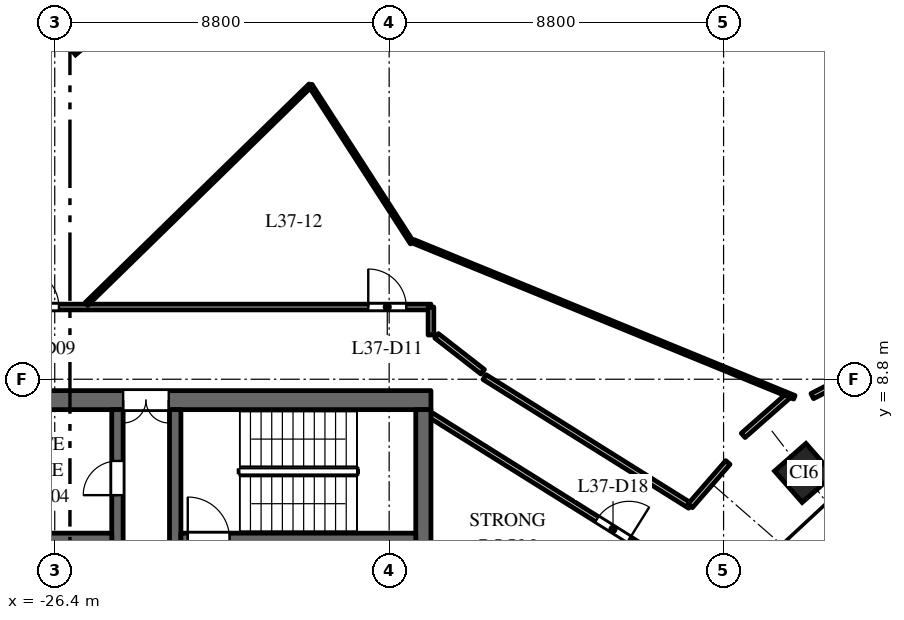
"""IFC4 building model, lengths in metres.
Left out: names, types, materials, properties, quantities, classifications, styles, units other than length and angle.
Written with IfcOpenShell. Run it as: python <this file> out.ifc"""

import sys

from ifc_helpers import new_model, si_unit, direction, frame, frame_2d, origin, origin_2d, place, context, subcontext, project, spatial, rectangle, extrude, element, fill, save


model = new_model("IFC4")
c1 = context("Model", 3, precision=1e-05, world=origin(), true_north=direction((0.0, 1.0)))
c2 = subcontext(c1, "Body", "Model", "MODEL_VIEW")
j1 = project(units=[si_unit("LENGTHUNIT", "METRE"), si_unit("PLANEANGLEUNIT", "RADIAN")], contexts=[c1])
p1 = place(None, origin())
s1 = spatial("IfcSite", under=j1, at=p1, CompositionType="ELEMENT")
p2 = place(p1, origin())
s2 = spatial("IfcBuilding", under=s1, at=p2, CompositionType="ELEMENT")
p3 = place(p2, frame((0.0, 0.0, 162.0)))
s3 = spatial("IfcBuildingStorey", under=s2, at=p3, CompositionType="ELEMENT", Elevation=162.0)
p4 = place(p3, frame((-25.783, 18.18, 0.0), z_axis=(0.0, 0.0, 1.0), x_axis=(-0.763035199656, -0.646356932419, 0.0)))
e1 = element("IfcColumn", 1, at=p4, inside=s3, PredefinedType="COLUMN", context=c2, shape_type="SweptSolid", body=[
    extrude(rectangle(XDim=1.2, YDim=1.2, at=origin_2d()), origin(), (0.0, 0.0, 1.0), 4.0),
])
p5 = place(p3, frame((-6.682, 6.334, 0.0), z_axis=(0.0, 0.0, 1.0), x_axis=(-0.75102249095, -0.660276622399, 0.0)))
e2 = element("IfcColumn", 2, at=p5, inside=s3, PredefinedType="COLUMN", context=c2, shape_type="SweptSolid", body=[
    extrude(rectangle(XDim=1.1, YDim=1.1, at=origin_2d()), origin(), (0.0, 0.0, 1.0), 4.0),
])
p6 = place(p3, frame((-16.5, 8.25, 0.0), z_axis=(0.0, 0.0, 1.0), x_axis=(-1.0, 0.0, 0.0)))
e3 = element("IfcWall", 3, at=p6, inside=s3, PredefinedType="SHEAR", context=c2, shape_type="SweptSolid", body=[
    extrude(rectangle(XDim=15.0, YDim=0.5, at=frame_2d((7.5, 0.0))), origin(), (0.0, 0.0, 1.0), 3.7),
])
p7 = place(p6, frame((6.9, 0.0, 0.0)))
e4 = element("IfcOpeningElement", 4, at=p7, cuts=e3, PredefinedType="OPENING", context=c2, shape_type="SweptSolid", body=[
    extrude(rectangle(XDim=1.2, YDim=2.1, at=frame_2d((0.6, 1.05))), frame((0.0, 0.26, 0.0), z_axis=(0.0, -1.0, 0.0), x_axis=(1.0, 0.0, 0.0)), (0.0, 0.0, 1.0), 0.52),
])
p8 = place(p6, frame((12.95, 0.0, 0.0)))
e5 = element("IfcOpeningElement", 5, at=p8, cuts=e3, PredefinedType="OPENING", context=c2, shape_type="SweptSolid", body=[
    extrude(rectangle(XDim=0.9, YDim=2.1, at=frame_2d((0.45, 1.05))), frame((0.0, 0.26, 0.0), z_axis=(0.0, -1.0, 0.0), x_axis=(1.0, 0.0, 0.0)), (0.0, 0.0, 1.0), 0.52),
])
p9 = place(p3, frame((-24.75, -8.0, 0.0), z_axis=(0.0, 0.0, 1.0), x_axis=(0.0, 1.0, 0.0)))
e6 = element("IfcWall", 6, at=p9, inside=s3, PredefinedType="SHEAR", context=c2, shape_type="SweptSolid", body=[
    extrude(rectangle(XDim=16.0, YDim=0.3, at=frame_2d((8.0, 0.0))), origin(), (0.0, 0.0, 1.0), 3.7),
])
p10 = place(p9, frame((4.425, 0.0, 0.0)))
e7 = element("IfcOpeningElement", 7, at=p10, cuts=e6, PredefinedType="OPENING", context=c2, shape_type="SweptSolid", body=[
    extrude(rectangle(XDim=1.1, YDim=2.1, at=frame_2d((0.55, 1.05))), frame((0.0, 0.16, 0.0), z_axis=(0.0, -1.0, 0.0), x_axis=(1.0, 0.0, 0.0)), (0.0, 0.0, 1.0), 0.32),
])
p11 = place(p9, frame((7.45, 0.0, 0.0)))
e8 = element("IfcOpeningElement", 8, at=p11, cuts=e6, PredefinedType="OPENING", context=c2, shape_type="SweptSolid", body=[
    extrude(rectangle(XDim=1.1, YDim=2.1, at=frame_2d((0.55, 1.05))), frame((0.0, 0.16, 0.0), z_axis=(0.0, -1.0, 0.0), x_axis=(1.0, 0.0, 0.0)), (0.0, 0.0, 1.0), 0.32),
])
p12 = place(p9, frame((10.475, 0.0, 0.0)))
e9 = element("IfcOpeningElement", 9, at=p12, cuts=e6, PredefinedType="OPENING", context=c2, shape_type="SweptSolid", body=[
    extrude(rectangle(XDim=1.1, YDim=2.1, at=frame_2d((0.55, 1.05))), frame((0.0, 0.16, 0.0), z_axis=(0.0, -1.0, 0.0), x_axis=(1.0, 0.0, 0.0)), (0.0, 0.0, 1.0), 0.32),
])
p13 = place(p9, frame((13.75, 0.0, 0.0)))
e10 = element("IfcOpeningElement", 10, at=p13, cuts=e6, PredefinedType="OPENING", context=c2, shape_type="SweptSolid", body=[
    extrude(rectangle(XDim=0.9, YDim=2.1, at=frame_2d((0.45, 1.05))), frame((0.0, 0.16, 0.0), z_axis=(0.0, -1.0, 0.0), x_axis=(1.0, 0.0, 0.0)), (0.0, 0.0, 1.0), 0.32),
])
p14 = place(p9, frame((1.35, 0.0, 0.0)))
e11 = element("IfcOpeningElement", 11, at=p14, cuts=e6, PredefinedType="OPENING", context=c2, shape_type="SweptSolid", body=[
    extrude(rectangle(XDim=0.9, YDim=2.1, at=frame_2d((0.45, 1.05))), frame((0.0, 0.16, 0.0), z_axis=(0.0, -1.0, 0.0), x_axis=(1.0, 0.0, 0.0)), (0.0, 0.0, 1.0), 0.32),
])
p15 = place(p3, frame((-16.7, -8.0, 0.0), z_axis=(0.0, 0.0, 1.0), x_axis=(0.0, 1.0, 0.0)))
e12 = element("IfcWall", 12, at=p15, inside=s3, PredefinedType="SHEAR", context=c2, shape_type="SweptSolid", body=[
    extrude(rectangle(XDim=16.0, YDim=0.4, at=frame_2d((8.0, 0.0))), origin(), (0.0, 0.0, 1.0), 3.7),
])
p16 = place(p3, frame((-24.9, 4.6, 0.0), z_axis=(0.0, 0.0, 1.0), x_axis=(-1.0, 0.0, 0.0)))
e13 = element("IfcWall", 13, at=p16, inside=s3, PredefinedType="SHEAR", context=c2, shape_type="SweptSolid", body=[
    extrude(rectangle(XDim=6.1, YDim=0.3, at=frame_2d((3.05, 0.0))), origin(), (0.0, 0.0, 1.0), 3.7),
])
p17 = place(p16, frame((4.2, 0.0, 0.0)))
e14 = element("IfcOpeningElement", 14, at=p17, cuts=e13, PredefinedType="OPENING", context=c2, shape_type="SweptSolid", body=[
    extrude(rectangle(XDim=0.9, YDim=2.1, at=frame_2d((0.45, 1.05))), frame((0.0, 0.16, 0.0), z_axis=(0.0, -1.0, 0.0), x_axis=(1.0, 0.0, 0.0)), (0.0, 0.0, 1.0), 0.32),
])
p18 = place(p3, frame((-23.23, 2.25, 0.0), z_axis=(0.0, 0.0, 1.0), x_axis=(0.0, 1.0, 0.0)))
e15 = element("IfcWall", 15, at=p18, inside=s3, PredefinedType="SHEAR", context=c2, shape_type="SweptSolid", body=[
    extrude(rectangle(XDim=5.75, YDim=0.3, at=frame_2d((2.875, 0.0))), origin(), (0.0, 0.0, 1.0), 3.7),
])
p19 = place(p18, frame((0.6, 0.0, 0.0)))
e16 = element("IfcOpeningElement", 16, at=p19, cuts=e15, PredefinedType="OPENING", context=c2, shape_type="SweptSolid", body=[
    extrude(rectangle(XDim=1.0, YDim=2.1, at=frame_2d((0.5, 1.05))), frame((0.0, 0.16, 0.0), z_axis=(0.0, -1.0, 0.0), x_axis=(1.0, 0.0, 0.0)), (0.0, 0.0, 1.0), 0.32),
])
p20 = place(p3, frame((-16.9, 4.6, 0.0), z_axis=(0.0, 0.0, 1.0), x_axis=(-1.0, 0.0, 0.0)))
e17 = element("IfcWall", 17, at=p20, inside=s3, PredefinedType="SHEAR", context=c2, shape_type="SweptSolid", body=[
    extrude(rectangle(XDim=6.18, YDim=0.3, at=frame_2d((3.09, 0.0))), origin(), (0.0, 0.0, 1.0), 3.7),
])
p21 = place(p20, frame((4.9, 0.0, 0.0)))
e18 = element("IfcOpeningElement", 18, at=p21, cuts=e17, PredefinedType="OPENING", context=c2, shape_type="SweptSolid", body=[
    extrude(rectangle(XDim=1.1, YDim=2.1, at=frame_2d((0.55, 1.05))), frame((0.0, 0.16, 0.0), z_axis=(0.0, -1.0, 0.0), x_axis=(1.0, 0.0, 0.0)), (0.0, 0.0, 1.0), 0.32),
])
p22 = place(p3, frame((-31.5, 10.7, 0.0), z_axis=(0.0, 0.0, 1.0), x_axis=(1.0, 0.0, 0.0)))
e19 = element("IfcWall", 19, at=p22, inside=s3, PredefinedType="PARTITIONING", context=c2, shape_type="SweptSolid", body=[
    extrude(rectangle(XDim=15.0, YDim=0.15, at=frame_2d((7.5, 0.0))), origin(), (0.0, 0.0, 1.0), 3.1),
])
p23 = place(p22, frame((4.21, 0.0, 0.0)))
e20 = element("IfcOpeningElement", 20, at=p23, cuts=e19, PredefinedType="OPENING", context=c2, shape_type="SweptSolid", body=[
    extrude(rectangle(XDim=1.0, YDim=2.1, at=frame_2d((0.5, 1.05))), frame((0.0, 0.085, 0.0), z_axis=(0.0, -1.0, 0.0), x_axis=(1.0, 0.0, 0.0)), (0.0, 0.0, 1.0), 0.17),
])
p24 = place(p22, frame((13.35, 0.0, 0.0)))
e21 = element("IfcOpeningElement", 21, at=p24, cuts=e19, PredefinedType="OPENING", context=c2, shape_type="SweptSolid", body=[
    extrude(rectangle(XDim=1.0, YDim=2.1, at=frame_2d((0.5, 1.05))), frame((0.0, 0.085, 0.0), z_axis=(0.0, -1.0, 0.0), x_axis=(1.0, 0.0, 0.0)), (0.0, 0.0, 1.0), 0.17),
])
p25 = place(p3, frame((-25.566, 10.778, 0.0), z_axis=(0.0, 0.0, 1.0), x_axis=(0.715430617602, 0.698683784982, 0.0)))
e22 = element("IfcWall", 22, at=p25, inside=s3, PredefinedType="PARTITIONING", context=c2, shape_type="SweptSolid", body=[
    extrude(rectangle(XDim=8.237, YDim=0.1, at=frame_2d((4.118, 0.0))), origin(), (0.0, 0.0, 1.0), 2.75),
])
p26 = place(p3, frame((-19.673, 16.533, 0.0), z_axis=(0.0, 0.0, 1.0), x_axis=(0.542297022656, -0.840186847801, 0.0)))
e23 = element("IfcWall", 23, at=p26, inside=s3, PredefinedType="PARTITIONING", context=c2, shape_type="SweptSolid", body=[
    extrude(rectangle(XDim=4.935, YDim=0.1, at=frame_2d((2.467, 0.0))), origin(), (0.0, 0.0, 1.0), 3.7),
])
p27 = place(p3, frame((-16.963, 12.427, 0.0), z_axis=(0.0, 0.0, 1.0), x_axis=(0.925484473487, -0.378785545308, 0.0)))
e24 = element("IfcWall", 24, at=p27, inside=s3, PredefinedType="PARTITIONING", context=c2, shape_type="SweptSolid", body=[
    extrude(rectangle(XDim=10.832, YDim=0.1, at=frame_2d((5.416, 0.0))), origin(), (0.0, 0.0, 1.0), 3.7),
])
p28 = place(p3, frame((-16.5, 9.964, 0.0), z_axis=(0.0, 0.0, 1.0), x_axis=(0.0, 1.0, 0.0)))
e25 = element("IfcWall", 25, at=p28, inside=s3, PredefinedType="PARTITIONING", context=c2, shape_type="SweptSolid", body=[
    extrude(rectangle(XDim=0.736, YDim=0.15, at=frame_2d((0.368, 0.0))), origin(), (0.0, 0.0, 1.0), 3.7),
])
p29 = place(p3, frame((-16.5, 7.851, 0.0), z_axis=(0.0, 0.0, 1.0), x_axis=(0.847690706888, -0.530490777917, 0.0)))
e26 = element("IfcWall", 26, at=p29, inside=s3, PredefinedType="PARTITIONING", context=c2, shape_type="SweptSolid", body=[
    extrude(rectangle(XDim=6.781, YDim=0.15, at=frame_2d((3.39, 0.0))), origin(), (0.0, 0.0, 1.0), 3.7),
])
p30 = place(p29, frame((5.151, 0.0, 0.0)))
e27 = element("IfcOpeningElement", 27, at=p30, cuts=e26, PredefinedType="OPENING", context=c2, shape_type="SweptSolid", body=[
    extrude(rectangle(XDim=1.0, YDim=2.1, at=frame_2d((0.5, 1.05))), frame((0.0, 0.085, 0.0), z_axis=(0.0, -1.0, 0.0), x_axis=(1.0, 0.0, 0.0)), (0.0, 0.0, 1.0), 0.17),
])
p31 = place(p3, frame((-15.089, 8.856, 0.0), z_axis=(0.0, 0.0, 1.0), x_axis=(0.847602682855, -0.530631408811, 0.0)))
e28 = element("IfcWall", 28, at=p31, inside=s3, PredefinedType="PARTITIONING", context=c2, shape_type="SweptSolid", body=[
    extrude(rectangle(XDim=6.383, YDim=0.15, at=frame_2d((3.191, 0.0))), origin(), (0.0, 0.0, 1.0), 3.7),
])
p32 = place(p3, frame((-9.679, 5.469, 0.0), z_axis=(0.0, 0.0, 1.0), x_axis=(0.656454677423, 0.75436546613, 0.0)))
e29 = element("IfcWall", 29, at=p32, inside=s3, PredefinedType="PARTITIONING", context=c2, shape_type="SweptSolid", body=[
    extrude(rectangle(XDim=1.511, YDim=0.15, at=frame_2d((0.755, 0.0))), origin(), (0.0, 0.0, 1.0), 2.75),
])
p33 = place(p3, frame((-8.284, 7.322, 0.0), z_axis=(0.0, 0.0, 1.0), x_axis=(0.750666784408, 0.660680996235, 0.0)))
e30 = element("IfcWall", 30, at=p33, inside=s3, PredefinedType="PARTITIONING", context=c2, shape_type="SweptSolid", body=[
    extrude(rectangle(XDim=1.555, YDim=0.15, at=frame_2d((0.777, 0.0))), origin(), (0.0, 0.0, 1.0), 3.7),
])
p34 = place(p3, frame((-6.466, 8.356, 0.0), z_axis=(0.0, 0.0, 1.0), x_axis=(0.889472002788, 0.456989667559, 0.0)))
e31 = element("IfcWall", 31, at=p34, inside=s3, PredefinedType="PARTITIONING", context=c2, shape_type="SweptSolid", body=[
    extrude(rectangle(XDim=1.355, YDim=0.15, at=frame_2d((0.677, 0.0))), origin(), (0.0, 0.0, 1.0), 3.7),
])
p35 = place(p3, frame((-16.352, 9.942, 0.0), z_axis=(0.0, 0.0, 1.0), x_axis=(0.788950226826, -0.614457109643, 0.0)))
e32 = element("IfcWall", 32, at=p35, inside=s3, PredefinedType="PARTITIONING", context=c2, shape_type="SweptSolid", body=[
    extrude(rectangle(XDim=1.538, YDim=0.15, at=frame_2d((0.769, 0.0))), origin(), (0.0, 0.0, 1.0), 3.7),
])
p36 = place(p21, origin())
e33 = element("IfcDoor", 33, at=p36, inside=s3, OperationType="SINGLE_SWING_RIGHT", PredefinedType="DOOR", context=c2, shape_type="SweptSolid", body=[
    extrude(rectangle(XDim=1.1, YDim=2.1, at=frame_2d((0.55, 1.05))), frame((0.0, 0.025, 0.0), z_axis=(0.0, -1.0, 0.0), x_axis=(1.0, 0.0, 0.0)), (0.0, 0.0, 1.0), 0.05),
])
fill(e18, e33)
p37 = place(p7, origin())
e34 = element("IfcDoor", 34, at=p37, inside=s3, OperationType="DOUBLE_DOOR_DOUBLE_SWING", PredefinedType="DOOR", context=c2, shape_type="SweptSolid", body=[
    extrude(rectangle(XDim=1.2, YDim=2.1, at=frame_2d((0.6, 1.05))), frame((0.0, 0.025, 0.0), z_axis=(0.0, -1.0, 0.0), x_axis=(1.0, 0.0, 0.0)), (0.0, 0.0, 1.0), 0.05),
])
fill(e4, e34)
p38 = place(p13, origin())
e35 = element("IfcDoor", 35, at=p38, inside=s3, OperationType="SINGLE_SWING_RIGHT", PredefinedType="DOOR", context=c2, shape_type="SweptSolid", body=[
    extrude(rectangle(XDim=0.9, YDim=2.1, at=frame_2d((0.45, 1.05))), frame((0.0, 0.025, 0.0), z_axis=(0.0, -1.0, 0.0), x_axis=(1.0, 0.0, 0.0)), (0.0, 0.0, 1.0), 0.05),
])
fill(e10, e35)
p39 = place(p23, origin())
e36 = element("IfcDoor", 36, at=p39, inside=s3, OperationType="SINGLE_SWING_LEFT", PredefinedType="DOOR", context=c2, shape_type="SweptSolid", body=[
    extrude(rectangle(XDim=1.0, YDim=2.1, at=frame_2d((0.5, 1.05))), frame((0.0, 0.025, 0.0), z_axis=(0.0, -1.0, 0.0), x_axis=(1.0, 0.0, 0.0)), (0.0, 0.0, 1.0), 0.05),
])
fill(e20, e36)
p40 = place(p24, origin())
e37 = element("IfcDoor", 37, at=p40, inside=s3, OperationType="SINGLE_SWING_LEFT", PredefinedType="DOOR", context=c2, shape_type="SweptSolid", body=[
    extrude(rectangle(XDim=1.0, YDim=2.1, at=frame_2d((0.5, 1.05))), frame((0.0, 0.025, 0.0), z_axis=(0.0, -1.0, 0.0), x_axis=(1.0, 0.0, 0.0)), (0.0, 0.0, 1.0), 0.05),
])
fill(e21, e37)
p41 = place(p30, origin())
e38 = element("IfcDoor", 38, at=p41, inside=s3, OperationType="SINGLE_SWING_RIGHT", PredefinedType="DOOR", context=c2, shape_type="SweptSolid", body=[
    extrude(rectangle(XDim=1.0, YDim=2.1, at=frame_2d((0.5, 1.05))), frame((0.0, 0.025, 0.0), z_axis=(0.0, -1.0, 0.0), x_axis=(1.0, 0.0, 0.0)), (0.0, 0.0, 1.0), 0.05),
])
fill(e27, e38)
save(model, sys.argv[1])
